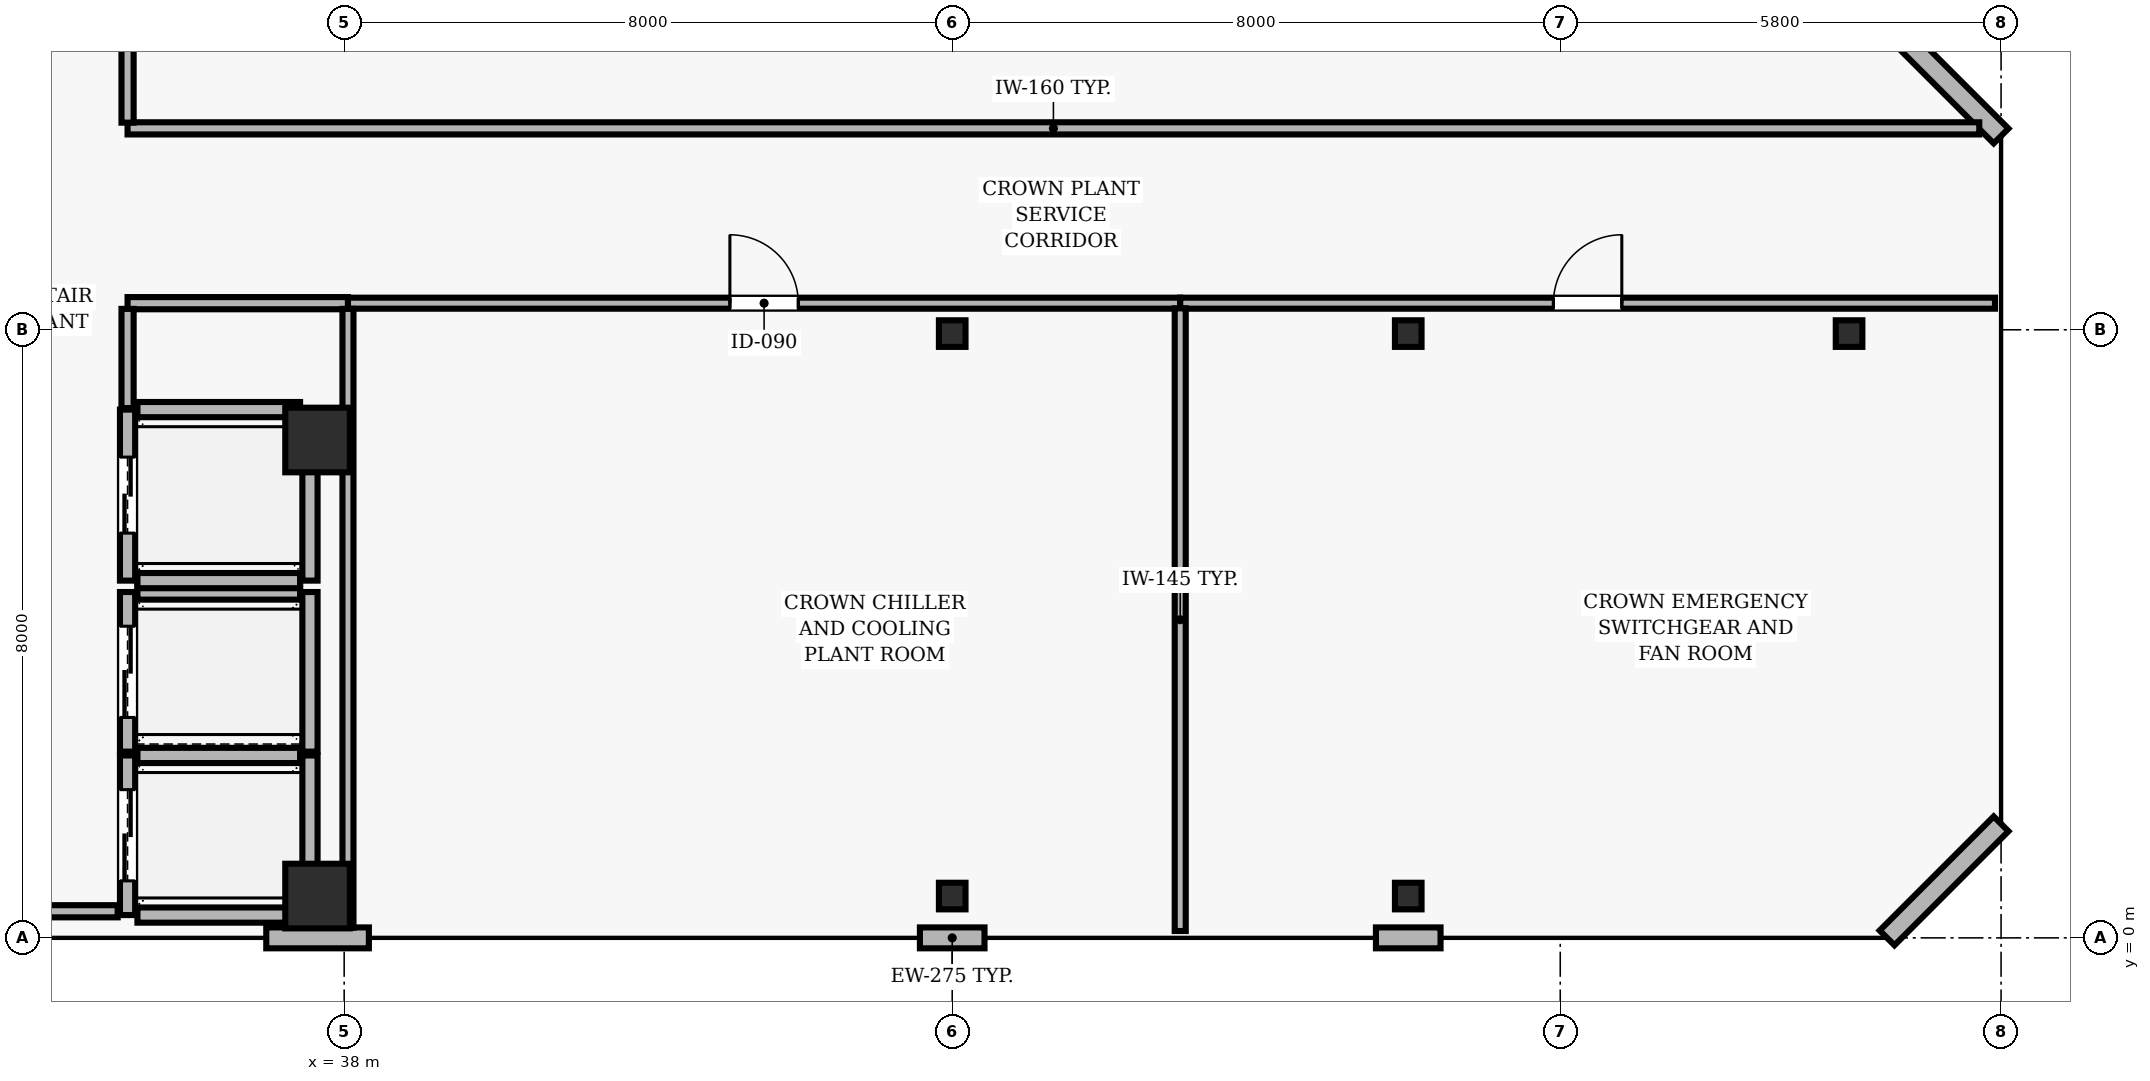
"""IFC4 building model, lengths in metres.
Left out: names, types, materials, properties, quantities, classifications, styles, units other than length and angle.
Written with IfcOpenShell. Run it as: python <this file> out.ifc"""

import sys

from ifc_helpers import new_model, si_unit, direction, frame, frame_2d, origin, origin_2d, place, context, subcontext, project, spatial, rectangle, hollow_rectangle, extrude, element, fill, save


model = new_model("IFC4")
c1 = context("Model", 3, precision=1e-05, world=origin(), true_north=direction((0.0, 1.0)))
c2 = subcontext(c1, "Body", "Model", "MODEL_VIEW")
j1 = project(units=[si_unit("LENGTHUNIT", "METRE"), si_unit("PLANEANGLEUNIT", "RADIAN")], contexts=[c1])
p1 = place(None, origin())
s1 = spatial("IfcSite", under=j1, at=p1, CompositionType="ELEMENT")
p2 = place(p1, origin())
s2 = spatial("IfcBuilding", under=s1, at=p2, CompositionType="ELEMENT")
p3 = place(p2, frame((0.0, 0.0, 316.7)))
s3 = spatial("IfcBuildingStorey", under=s2, at=p3, CompositionType="ELEMENT", Elevation=316.7)
for number, where, z_axis, x_axis in (
    (1, (37.65, 0.55, 0.0), (0.0, 0.0, 1.0), (1.0, 0.0, 0.0)),
    (2, (37.65, 6.55, 0.0), (0.0, 0.0, 1.0), (1.0, 0.0, 0.0)),
):
    element("IfcColumn", number, at=place(p3, frame(where, z_axis=z_axis, x_axis=x_axis)), inside=s3, PredefinedType="COLUMN", context=c2, shape_type="SweptSolid", body=[
        extrude(rectangle(XDim=0.85, YDim=0.85, at=origin_2d()), origin(), (0.0, 0.0, 1.0), 5.0),
    ])
for number, where, z_axis, x_axis in (
    (3, (46.0, 0.55, 0.0), (0.0, 0.0, 1.0), (1.0, 0.0, 0.0)),
    (4, (46.0, 7.95, 0.0), (0.0, 0.0, 1.0), (1.0, 0.0, 0.0)),
    (5, (52.0, 0.55, 0.0), (0.0, 0.0, 1.0), (1.0, 0.0, 0.0)),
    (6, (52.0, 7.95, 0.0), (0.0, 0.0, 1.0), (1.0, 0.0, 0.0)),
    (7, (57.8, 7.95, 0.0), (0.0, 0.0, 1.0), (1.0, 0.0, 0.0)),
):
    element("IfcColumn", number, at=place(p3, frame(where, z_axis=z_axis, x_axis=x_axis)), inside=s3, PredefinedType="COLUMN", context=c2, shape_type="SweptSolid", body=[
        extrude(hollow_rectangle(XDim=0.35, YDim=0.35, WallThickness=0.016, at=origin_2d()), origin(), (0.0, 0.0, 1.0), 5.0),
    ])
p4 = place(p3, frame((36.975, 0.0, 0.0), z_axis=(0.0, 0.0, 1.0), x_axis=(1.0, 0.0, 0.0)))
e8 = element("IfcWall", 8, at=p4, inside=s3, PredefinedType="SOLIDWALL", context=c2, shape_type="SweptSolid", body=[
    extrude(rectangle(XDim=1.35, YDim=0.275, at=frame_2d((0.675, 0.0))), origin(), (0.0, 0.0, 1.0), 4.74),
])
for number, where, z_axis, x_axis in (
    (9, (45.575, 0.0, 0.0), (0.0, 0.0, 1.0), (1.0, 0.0, 0.0)),
    (10, (51.575, 0.0, 0.0), (0.0, 0.0, 1.0), (1.0, 0.0, 0.0)),
):
    element("IfcWall", number, at=place(p3, frame(where, z_axis=z_axis, x_axis=x_axis)), inside=s3, PredefinedType="SOLIDWALL", context=c2, shape_type="SweptSolid", body=[
        extrude(rectangle(XDim=0.85, YDim=0.275, at=frame_2d((0.425, 0.0))), origin(), (0.0, 0.0, 1.0), 4.74),
    ])
for number, where, z_axis, x_axis in (
    (11, (58.3, 0.0, 0.0), (0.0, 0.0, 1.0), (0.707, 0.707, 0.0)),
    (12, (59.8, 10.55, 0.0), (0.0, 0.0, 1.0), (-0.707, 0.707, 0.0)),
):
    element("IfcWall", number, at=place(p3, frame(where, z_axis=z_axis, x_axis=x_axis)), inside=s3, PredefinedType="SOLIDWALL", context=c2, shape_type="SweptSolid", body=[
        extrude(rectangle(XDim=2.121, YDim=0.275, at=frame_2d((1.061, 0.0))), origin(), (0.0, 0.0, 1.0), 4.74),
    ])
p5 = place(p3, frame((35.15, 2.4, 0.0), z_axis=(0.0, 0.0, 1.0), x_axis=(0.0, -1.0, 0.0)))
e13 = element("IfcWall", 13, at=p5, inside=s3, PredefinedType="SOLIDWALL", context=c2, shape_type="SweptSolid", body=[
    extrude(rectangle(XDim=2.1, YDim=0.2, at=frame_2d((1.05, 0.0))), origin(), (0.0, 0.0, 1.0), 4.74),
])
p6 = place(p5, frame((0.45, 0.0, 0.0)))
e14 = element("IfcOpeningElement", 14, at=p6, cuts=e13, PredefinedType="OPENING", context=c2, shape_type="SweptSolid", body=[
    extrude(rectangle(XDim=1.2, YDim=2.15, at=frame_2d((0.6, 1.075))), frame((0.0, 0.11, 0.0), z_axis=(0.0, -1.0, 0.0), x_axis=(1.0, 0.0, 0.0)), (0.0, 0.0, 1.0), 0.22),
])
p7 = place(p3, frame((37.55, 0.3, 0.0), z_axis=(0.0, 0.0, 1.0), x_axis=(0.0, 1.0, 0.0)))
e15 = element("IfcWall", 15, at=p7, inside=s3, PredefinedType="SOLIDWALL", context=c2, shape_type="SweptSolid", body=[
    extrude(rectangle(XDim=2.1, YDim=0.2, at=frame_2d((1.05, 0.0))), origin(), (0.0, 0.0, 1.0), 4.74),
])
for number, where, z_axis, x_axis in (
    (16, (35.28, 0.3, 0.0), (0.0, 0.0, 1.0), (1.0, 0.0, 0.0)),
    (17, (37.42, 2.4, 0.0), (0.0, 0.0, 1.0), (-1.0, 0.0, 0.0)),
):
    element("IfcWall", number, at=place(p3, frame(where, z_axis=z_axis, x_axis=x_axis)), inside=s3, PredefinedType="SOLIDWALL", context=c2, shape_type="SweptSolid", body=[
        extrude(rectangle(XDim=2.14, YDim=0.2, at=frame_2d((1.07, 0.0))), origin(), (0.0, 0.0, 1.0), 4.74),
    ])
p8 = place(p3, frame((35.15, 4.55, 0.0), z_axis=(0.0, 0.0, 1.0), x_axis=(0.0, -1.0, 0.0)))
e18 = element("IfcWall", 18, at=p8, inside=s3, PredefinedType="SOLIDWALL", context=c2, shape_type="SweptSolid", body=[
    extrude(rectangle(XDim=2.1, YDim=0.2, at=frame_2d((1.05, 0.0))), origin(), (0.0, 0.0, 1.0), 4.74),
])
p9 = place(p8, frame((0.45, 0.0, 0.0)))
e19 = element("IfcOpeningElement", 19, at=p9, cuts=e18, PredefinedType="OPENING", context=c2, shape_type="SweptSolid", body=[
    extrude(rectangle(XDim=1.2, YDim=2.15, at=frame_2d((0.6, 1.075))), frame((0.0, 0.11, 0.0), z_axis=(0.0, -1.0, 0.0), x_axis=(1.0, 0.0, 0.0)), (0.0, 0.0, 1.0), 0.22),
])
p10 = place(p3, frame((37.55, 2.45, 0.0), z_axis=(0.0, 0.0, 1.0), x_axis=(0.0, 1.0, 0.0)))
e20 = element("IfcWall", 20, at=p10, inside=s3, PredefinedType="SOLIDWALL", context=c2, shape_type="SweptSolid", body=[
    extrude(rectangle(XDim=2.1, YDim=0.2, at=frame_2d((1.05, 0.0))), origin(), (0.0, 0.0, 1.0), 4.74),
])
p11 = place(p3, frame((37.42, 4.55, 0.0), z_axis=(0.0, 0.0, 1.0), x_axis=(-1.0, 0.0, 0.0)))
e21 = element("IfcWall", 21, at=p11, inside=s3, PredefinedType="SOLIDWALL", context=c2, shape_type="SweptSolid", body=[
    extrude(rectangle(XDim=2.14, YDim=0.2, at=frame_2d((1.07, 0.0))), origin(), (0.0, 0.0, 1.0), 4.74),
])
p12 = place(p3, frame((35.15, 6.95, 0.0), z_axis=(0.0, 0.0, 1.0), x_axis=(0.0, -1.0, 0.0)))
e22 = element("IfcWall", 22, at=p12, inside=s3, PredefinedType="SOLIDWALL", context=c2, shape_type="SweptSolid", body=[
    extrude(rectangle(XDim=2.25, YDim=0.2, at=frame_2d((1.125, 0.0))), origin(), (0.0, 0.0, 1.0), 4.74),
])
p13 = place(p12, frame((0.625, 0.0, 0.0)))
e23 = element("IfcOpeningElement", 23, at=p13, cuts=e22, PredefinedType="OPENING", context=c2, shape_type="SweptSolid", body=[
    extrude(rectangle(XDim=1.0, YDim=2.1, at=frame_2d((0.5, 1.05))), frame((0.0, 0.11, 0.0), z_axis=(0.0, -1.0, 0.0), x_axis=(1.0, 0.0, 0.0)), (0.0, 0.0, 1.0), 0.22),
])
p14 = place(p3, frame((37.55, 4.7, 0.0), z_axis=(0.0, 0.0, 1.0), x_axis=(0.0, 1.0, 0.0)))
e24 = element("IfcWall", 24, at=p14, inside=s3, PredefinedType="SOLIDWALL", context=c2, shape_type="SweptSolid", body=[
    extrude(rectangle(XDim=2.25, YDim=0.2, at=frame_2d((1.125, 0.0))), origin(), (0.0, 0.0, 1.0), 4.74),
])
for number, where, z_axis, x_axis in (
    (25, (35.28, 4.7, 0.0), (0.0, 0.0, 1.0), (1.0, 0.0, 0.0)),
    (26, (37.42, 6.95, 0.0), (0.0, 0.0, 1.0), (-1.0, 0.0, 0.0)),
):
    element("IfcWall", number, at=place(p3, frame(where, z_axis=z_axis, x_axis=x_axis)), inside=s3, PredefinedType="SOLIDWALL", context=c2, shape_type="SweptSolid", body=[
        extrude(rectangle(XDim=2.14, YDim=0.2, at=frame_2d((1.07, 0.0))), origin(), (0.0, 0.0, 1.0), 4.74),
    ])
p15 = place(p3, frame((31.65, 0.35, 0.0), z_axis=(0.0, 0.0, 1.0), x_axis=(1.0, 0.0, 0.0)))
e27 = element("IfcWall", 27, at=p15, inside=s3, PredefinedType="PARTITIONING", context=c2, shape_type="SweptSolid", body=[
    extrude(rectangle(XDim=3.37, YDim=0.16, at=frame_2d((1.685, 0.0))), origin(), (0.0, 0.0, 1.0), 4.74),
])
p16 = place(p3, frame((35.15, 8.35, 0.0), z_axis=(0.0, 0.0, 1.0), x_axis=(1.0, 0.0, 0.0)))
e28 = element("IfcWall", 28, at=p16, inside=s3, PredefinedType="PARTITIONING", context=c2, shape_type="SweptSolid", body=[
    extrude(rectangle(XDim=2.9, YDim=0.16, at=frame_2d((1.45, 0.0))), origin(), (0.0, 0.0, 1.0), 4.277),
])
p17 = place(p3, frame((38.05, 8.35, 0.0), z_axis=(0.0, 0.0, 1.0), x_axis=(1.0, 0.0, 0.0)))
e29 = element("IfcWall", 29, at=p17, inside=s3, PredefinedType="PARTITIONING", context=c2, shape_type="SweptSolid", body=[
    extrude(rectangle(XDim=10.95, YDim=0.145, at=frame_2d((5.475, 0.0))), origin(), (0.0, 0.0, 1.0), 4.277),
])
p18 = place(p17, frame((5.025, 0.0, 0.0)))
e30 = element("IfcOpeningElement", 30, at=p18, cuts=e29, PredefinedType="OPENING", context=c2, shape_type="SweptSolid", body=[
    extrude(rectangle(XDim=0.9, YDim=2.1, at=frame_2d((0.45, 1.05))), frame((0.0, 0.083, 0.0), z_axis=(0.0, -1.0, 0.0), x_axis=(1.0, 0.0, 0.0)), (0.0, 0.0, 1.0), 0.165),
])
p19 = place(p3, frame((49.0, 8.35, 0.0), z_axis=(0.0, 0.0, 1.0), x_axis=(1.0, 0.0, 0.0)))
e31 = element("IfcWall", 31, at=p19, inside=s3, PredefinedType="PARTITIONING", context=c2, shape_type="SweptSolid", body=[
    extrude(rectangle(XDim=10.72, YDim=0.145, at=frame_2d((5.36, 0.0))), origin(), (0.0, 0.0, 1.0), 4.277),
])
p20 = place(p19, frame((4.91, 0.0, 0.0)))
e32 = element("IfcOpeningElement", 32, at=p20, cuts=e31, PredefinedType="OPENING", context=c2, shape_type="SweptSolid", body=[
    extrude(rectangle(XDim=0.9, YDim=2.1, at=frame_2d((0.45, 1.05))), frame((0.0, 0.083, 0.0), z_axis=(0.0, -1.0, 0.0), x_axis=(1.0, 0.0, 0.0)), (0.0, 0.0, 1.0), 0.165),
])
p21 = place(p3, frame((59.513, 10.65, 0.0), z_axis=(0.0, 0.0, 1.0), x_axis=(-1.0, 0.0, 0.0)))
e33 = element("IfcWall", 33, at=p21, inside=s3, PredefinedType="PARTITIONING", context=c2, shape_type="SweptSolid", body=[
    extrude(rectangle(XDim=24.363, YDim=0.16, at=frame_2d((12.182, 0.0))), origin(), (0.0, 0.0, 1.0), 4.74),
])
p22 = place(p3, frame((35.15, 6.97, 0.0), z_axis=(0.0, 0.0, 1.0), x_axis=(0.0, 1.0, 0.0)))
e34 = element("IfcWall", 34, at=p22, inside=s3, PredefinedType="PARTITIONING", context=c2, shape_type="SweptSolid", body=[
    extrude(rectangle(XDim=1.305, YDim=0.16, at=frame_2d((0.652, 0.0))), origin(), (0.0, 0.0, 1.0), 4.74),
])
p23 = place(p3, frame((35.15, 10.725, 0.0), z_axis=(0.0, 0.0, 1.0), x_axis=(0.0, 1.0, 0.0)))
e35 = element("IfcWall", 35, at=p23, inside=s3, PredefinedType="PARTITIONING", context=c2, shape_type="SweptSolid", body=[
    extrude(rectangle(XDim=1.125, YDim=0.16, at=frame_2d((0.562, 0.0))), origin(), (0.0, 0.0, 1.0), 4.74),
])
p24 = place(p3, frame((38.05, 8.275, 0.0), z_axis=(0.0, 0.0, 1.0), x_axis=(0.0, -1.0, 0.0)))
e36 = element("IfcWall", 36, at=p24, inside=s3, PredefinedType="PARTITIONING", context=c2, shape_type="SweptSolid", body=[
    extrude(rectangle(XDim=8.142, YDim=0.145, at=frame_2d((4.071, 0.0))), origin(), (0.0, 0.0, 1.0), 4.277),
])
p25 = place(p3, frame((49.0, 0.09, 0.0), z_axis=(0.0, 0.0, 1.0), x_axis=(0.0, 1.0, 0.0)))
e37 = element("IfcWall", 37, at=p25, inside=s3, PredefinedType="PARTITIONING", context=c2, shape_type="SweptSolid", body=[
    extrude(rectangle(XDim=8.192, YDim=0.145, at=frame_2d((4.096, 0.0))), origin(), (0.0, 0.0, 1.0), 4.74),
])
p26 = place(p6, origin())
e38 = element("IfcDoor", 38, at=p26, inside=s3, OperationType="DOUBLE_DOOR_SLIDING", PredefinedType="DOOR", context=c2, shape_type="SweptSolid", body=[
    extrude(rectangle(XDim=1.2, YDim=2.15, at=frame_2d((0.6, 1.075))), frame((0.0, 0.025, 0.0), z_axis=(0.0, -1.0, 0.0), x_axis=(1.0, 0.0, 0.0)), (0.0, 0.0, 1.0), 0.05),
])
fill(e14, e38)
p27 = place(p9, origin())
e39 = element("IfcDoor", 39, at=p27, inside=s3, OperationType="DOUBLE_DOOR_SLIDING", PredefinedType="DOOR", context=c2, shape_type="SweptSolid", body=[
    extrude(rectangle(XDim=1.2, YDim=2.15, at=frame_2d((0.6, 1.075))), frame((0.0, 0.025, 0.0), z_axis=(0.0, -1.0, 0.0), x_axis=(1.0, 0.0, 0.0)), (0.0, 0.0, 1.0), 0.05),
])
fill(e19, e39)
p28 = place(p13, origin())
e40 = element("IfcDoor", 40, at=p28, inside=s3, OperationType="DOUBLE_DOOR_SLIDING", PredefinedType="DOOR", context=c2, shape_type="SweptSolid", body=[
    extrude(rectangle(XDim=1.0, YDim=2.1, at=frame_2d((0.5, 1.05))), frame((0.0, 0.025, 0.0), z_axis=(0.0, -1.0, 0.0), x_axis=(1.0, 0.0, 0.0)), (0.0, 0.0, 1.0), 0.05),
])
fill(e23, e40)
p29 = place(p18, origin())
e41 = element("IfcDoor", 41, at=p29, inside=s3, OperationType="SINGLE_SWING_LEFT", PredefinedType="DOOR", context=c2, shape_type="SweptSolid", body=[
    extrude(rectangle(XDim=0.9, YDim=2.1, at=frame_2d((0.45, 1.05))), frame((0.0, 0.025, 0.0), z_axis=(0.0, -1.0, 0.0), x_axis=(1.0, 0.0, 0.0)), (0.0, 0.0, 1.0), 0.05),
])
fill(e30, e41)
p30 = place(p20, origin())
e42 = element("IfcDoor", 42, at=p30, inside=s3, OperationType="SINGLE_SWING_RIGHT", PredefinedType="DOOR", context=c2, shape_type="SweptSolid", body=[
    extrude(rectangle(XDim=0.9, YDim=2.1, at=frame_2d((0.45, 1.05))), frame((0.0, 0.025, 0.0), z_axis=(0.0, -1.0, 0.0), x_axis=(1.0, 0.0, 0.0)), (0.0, 0.0, 1.0), 0.05),
])
fill(e32, e42)
save(model, sys.argv[1])
